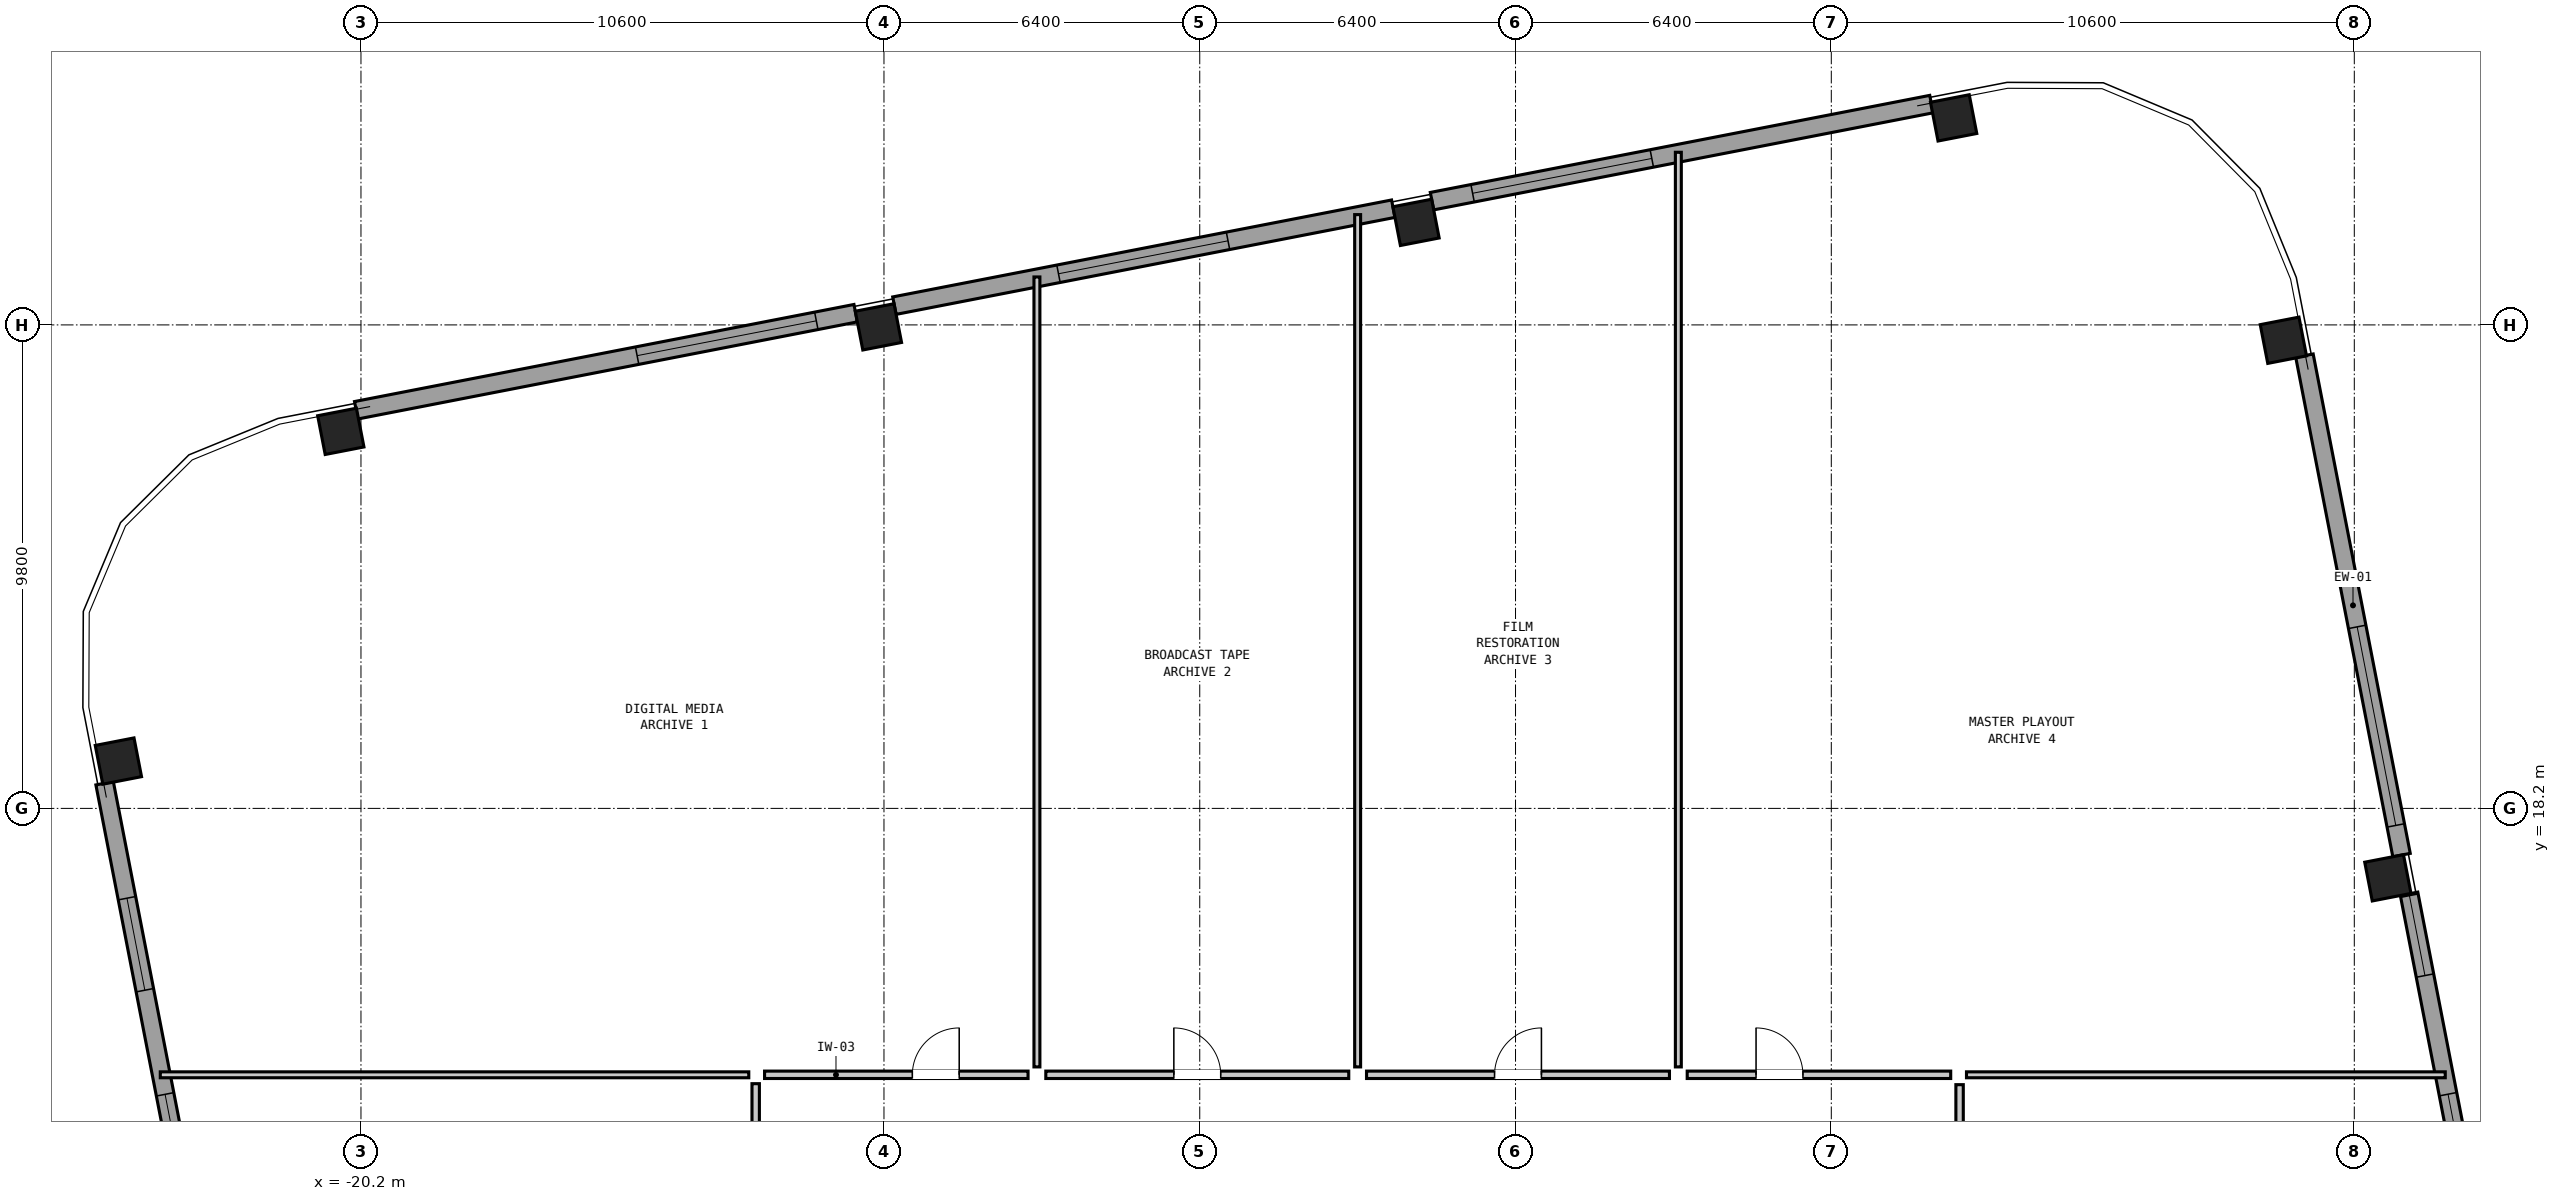
"""IFC4 building model, lengths in metres.
Left out: names, types, materials, properties, quantities, classifications, styles, units other than length and angle.
Written with IfcOpenShell. Run it as: python <this file> out.ifc"""

import sys

from ifc_helpers import new_model, si_unit, direction, frame, frame_2d, origin, origin_2d, place, context, subcontext, project, spatial, rectangle, hollow_rectangle, extrude, element, fill, save


model = new_model("IFC4")
c1 = context("Model", 3, precision=1e-05, world=origin(), true_north=direction((0.0, 1.0)))
c2 = subcontext(c1, "Body", "Model", "MODEL_VIEW")
j1 = project(units=[si_unit("LENGTHUNIT", "METRE"), si_unit("PLANEANGLEUNIT", "RADIAN")], contexts=[c1])
p1 = place(None, origin())
s1 = spatial("IfcSite", under=j1, at=p1, CompositionType="ELEMENT")
p2 = place(p1, origin())
s2 = spatial("IfcBuilding", under=s1, at=p2, CompositionType="ELEMENT")
p3 = place(p2, frame((0.0, 0.0, 131.1)))
s3 = spatial("IfcBuildingStorey", under=s2, at=p3, CompositionType="ELEMENT", Elevation=131.1)
for number, where, z_axis, x_axis in (
    (1, (20.88, 16.792, 0.0), (0.0, 0.0, 1.0), (-0.191, 0.982, 0.0)),
    (2, (18.762, 27.689, 0.0), (0.0, 0.0, 1.0), (-0.191, 0.982, 0.0)),
    (3, (12.08, 32.196, 0.0), (0.0, 0.0, 1.0), (0.982, 0.191, 0.0)),
    (4, (1.183, 30.078, 0.0), (0.0, 0.0, 1.0), (0.982, 0.191, 0.0)),
    (5, (-9.713, 27.96, 0.0), (0.0, 0.0, 1.0), (0.982, 0.191, 0.0)),
    (6, (-20.609, 25.842, 0.0), (0.0, 0.0, 1.0), (0.982, 0.191, 0.0)),
    (7, (-25.116, 19.159, 0.0), (0.0, 0.0, 1.0), (-0.191, 0.982, 0.0)),
):
    element("IfcColumn", number, at=place(p3, frame(where, z_axis=z_axis, x_axis=x_axis)), inside=s3, PredefinedType="COLUMN", context=c2, shape_type="SweptSolid", body=[
        extrude(hollow_rectangle(XDim=0.8, YDim=0.8, WallThickness=0.05, at=origin_2d()), origin(), (0.0, 0.0, 1.0), 3.05),
    ])
p4 = place(p3, frame((19.19, 27.376, 0.0), z_axis=(0.0, 0.0, 1.0), x_axis=(0.190822765986, -0.981624506612, 0.0)))
e8 = element("IfcWall", 8, at=p4, inside=s3, PredefinedType="SOLIDWALL", context=c2, shape_type="SweptSolid", body=[
    extrude(rectangle(XDim=10.312, YDim=0.36, at=frame_2d((5.156, 0.0))), origin(), (0.0, 0.0, 1.0), 2.067),
])
p5 = place(p4, frame((5.6, 0.0, 0.2)))
e9 = element("IfcOpeningElement", 9, at=p5, cuts=e8, PredefinedType="OPENING", context=c2, shape_type="SweptSolid", body=[
    extrude(rectangle(XDim=4.1, YDim=1.05, at=frame_2d((2.05, 0.525))), frame((0.0, 0.192, 0.0), z_axis=(0.0, -1.0, 0.0), x_axis=(1.0, 0.0, 0.0)), (0.0, 0.0, 1.0), 0.384),
])
p6 = place(p3, frame((21.31, 16.469, 0.0), z_axis=(0.0, 0.0, 1.0), x_axis=(0.190811924826, -0.981626614016, 0.0)))
e10 = element("IfcWall", 10, at=p6, inside=s3, PredefinedType="SOLIDWALL", context=c2, shape_type="SweptSolid", body=[
    extrude(rectangle(XDim=10.3, YDim=0.36, at=frame_2d((5.15, 0.0))), origin(), (0.0, 0.0, 1.0), 2.067),
])
p7 = place(p6, frame((0.038, 0.0, 1.15)))
e11 = element("IfcOpeningElement", 11, at=p7, cuts=e10, PredefinedType="OPENING", context=c2, shape_type="SweptSolid", body=[
    extrude(rectangle(XDim=1.65, YDim=0.75, at=frame_2d((0.825, 0.375))), frame((0.0, 0.192, 0.0), z_axis=(0.0, -1.0, 0.0), x_axis=(1.0, 0.0, 0.0)), (0.0, 0.0, 1.0), 0.384),
])
p8 = place(p6, frame((4.138, 0.0, 0.2)))
e12 = element("IfcOpeningElement", 12, at=p8, cuts=e10, PredefinedType="OPENING", context=c2, shape_type="SweptSolid", body=[
    extrude(rectangle(XDim=2.6, YDim=1.3, at=frame_2d((1.3, 0.65))), frame((0.0, 0.192, 0.0), z_axis=(0.0, -1.0, 0.0), x_axis=(1.0, 0.0, 0.0)), (0.0, 0.0, 1.0), 0.384),
])
p9 = place(p6, frame((8.638, 0.0, 1.15)))
e13 = element("IfcOpeningElement", 13, at=p9, cuts=e10, PredefinedType="OPENING", context=c2, shape_type="SweptSolid", body=[
    extrude(rectangle(XDim=1.6, YDim=0.75, at=frame_2d((0.8, 0.375))), frame((0.0, 0.192, 0.0), z_axis=(0.0, -1.0, 0.0), x_axis=(1.0, 0.0, 0.0)), (0.0, 0.0, 1.0), 0.384),
])
p10 = place(p3, frame((-20.296, 26.27, 0.0), z_axis=(0.0, 0.0, 1.0), x_axis=(0.981628941133, 0.190799952646, 0.0)))
e14 = element("IfcWall", 14, at=p10, inside=s3, PredefinedType="SOLIDWALL", context=c2, shape_type="SweptSolid", body=[
    extrude(rectangle(XDim=10.312, YDim=0.36, at=frame_2d((5.156, 0.0))), origin(), (0.0, 0.0, 1.0), 2.067),
])
p11 = place(p10, frame((5.8, 0.0, 0.2)))
e15 = element("IfcOpeningElement", 15, at=p11, cuts=e14, PredefinedType="OPENING", context=c2, shape_type="SweptSolid", body=[
    extrude(rectangle(XDim=3.7, YDim=1.1, at=frame_2d((1.85, 0.55))), frame((0.0, 0.192, 0.0), z_axis=(0.0, -1.0, 0.0), x_axis=(1.0, 0.0, 0.0)), (0.0, 0.0, 1.0), 0.384),
])
p12 = place(p3, frame((-9.389, 28.39, 0.0), z_axis=(0.0, 0.0, 1.0), x_axis=(0.981627477005, 0.190807485147, 0.0)))
e16 = element("IfcWall", 16, at=p12, inside=s3, PredefinedType="SOLIDWALL", context=c2, shape_type="SweptSolid", body=[
    extrude(rectangle(XDim=10.3, YDim=0.36, at=frame_2d((5.15, 0.0))), origin(), (0.0, 0.0, 1.0), 2.067),
])
p13 = place(p12, frame((3.388, 0.0, 0.2)))
e17 = element("IfcOpeningElement", 17, at=p13, cuts=e16, PredefinedType="OPENING", context=c2, shape_type="SweptSolid", body=[
    extrude(rectangle(XDim=3.5, YDim=1.15, at=frame_2d((1.75, 0.575))), frame((0.0, 0.192, 0.0), z_axis=(0.0, -1.0, 0.0), x_axis=(1.0, 0.0, 0.0)), (0.0, 0.0, 1.0), 0.384),
])
p14 = place(p3, frame((1.507, 30.508, 0.0), z_axis=(0.0, 0.0, 1.0), x_axis=(0.981628941133, 0.190799952646, 0.0)))
e18 = element("IfcWall", 18, at=p14, inside=s3, PredefinedType="SOLIDWALL", context=c2, shape_type="SweptSolid", body=[
    extrude(rectangle(XDim=10.312, YDim=0.36, at=frame_2d((5.156, 0.0))), origin(), (0.0, 0.0, 1.0), 2.067),
])
p15 = place(p14, frame((0.838, 0.0, 0.2)))
e19 = element("IfcOpeningElement", 19, at=p15, cuts=e18, PredefinedType="OPENING", context=c2, shape_type="SweptSolid", body=[
    extrude(rectangle(XDim=3.7, YDim=1.1, at=frame_2d((1.85, 0.55))), frame((0.0, 0.192, 0.0), z_axis=(0.0, -1.0, 0.0), x_axis=(1.0, 0.0, 0.0)), (0.0, 0.0, 1.0), 0.384),
])
p16 = place(p3, frame((-23.428, 8.587, 0.0), z_axis=(0.0, 0.0, 1.0), x_axis=(-0.190822765986, 0.981624506612, 0.0)))
e20 = element("IfcWall", 20, at=p16, inside=s3, PredefinedType="SOLIDWALL", context=c2, shape_type="SweptSolid", body=[
    extrude(rectangle(XDim=10.312, YDim=0.36, at=frame_2d((5.156, 0.0))), origin(), (0.0, 0.0, 1.0), 2.067),
])
p17 = place(p16, frame((1.188, 0.0, 0.2)))
e21 = element("IfcOpeningElement", 21, at=p17, cuts=e20, PredefinedType="OPENING", context=c2, shape_type="SweptSolid", body=[
    extrude(rectangle(XDim=2.7, YDim=1.35, at=frame_2d((1.35, 0.675))), frame((0.0, 0.192, 0.0), z_axis=(0.0, -1.0, 0.0), x_axis=(1.0, 0.0, 0.0)), (0.0, 0.0, 1.0), 0.384),
])
p18 = place(p16, frame((6.038, 0.0, 1.2)))
e22 = element("IfcOpeningElement", 22, at=p18, cuts=e20, PredefinedType="OPENING", context=c2, shape_type="SweptSolid", body=[
    extrude(rectangle(XDim=1.9, YDim=0.7, at=frame_2d((0.95, 0.35))), frame((0.0, 0.192, 0.0), z_axis=(0.0, -1.0, 0.0), x_axis=(1.0, 0.0, 0.0)), (0.0, 0.0, 1.0), 0.384),
])
p19 = place(p3, frame((-24.267, 12.8, 0.0), z_axis=(0.0, 0.0, 1.0), x_axis=(1.0, 0.0, 0.0)))
e23 = element("IfcWall", 23, at=p19, inside=s3, PredefinedType="PARTITIONING", context=c2, shape_type="SweptSolid", body=[
    extrude(rectangle(XDim=11.927, YDim=0.12, at=frame_2d((5.964, 0.0))), origin(), (0.0, 0.0, 1.0), 2.83),
])
p20 = place(p3, frame((12.34, 12.8, 0.0), z_axis=(0.0, 0.0, 1.0), x_axis=(1.0, 0.0, 0.0)))
e24 = element("IfcWall", 24, at=p20, inside=s3, PredefinedType="PARTITIONING", context=c2, shape_type="SweptSolid", body=[
    extrude(rectangle(XDim=9.703, YDim=0.12, at=frame_2d((4.852, 0.0))), origin(), (0.0, 0.0, 1.0), 2.83),
])
p21 = place(p3, frame((-6.5, 12.96, 0.0), z_axis=(0.0, 0.0, 1.0), x_axis=(0.0, 1.0, 0.0)))
e25 = element("IfcWall", 25, at=p21, inside=s3, PredefinedType="PARTITIONING", context=c2, shape_type="SweptSolid", body=[
    extrude(rectangle(XDim=16.012, YDim=0.12, at=frame_2d((8.006, 0.0))), origin(), (0.0, 0.0, 1.0), 2.347),
])
p22 = place(p3, frame((0.0, 12.96, 0.0), z_axis=(0.0, 0.0, 1.0), x_axis=(0.0, 1.0, 0.0)))
e26 = element("IfcWall", 26, at=p22, inside=s3, PredefinedType="PARTITIONING", context=c2, shape_type="SweptSolid", body=[
    extrude(rectangle(XDim=17.275, YDim=0.12, at=frame_2d((8.638, 0.0))), origin(), (0.0, 0.0, 1.0), 2.347),
])
p23 = place(p3, frame((6.5, 12.96, 0.0), z_axis=(0.0, 0.0, 1.0), x_axis=(0.0, 1.0, 0.0)))
e27 = element("IfcWall", 27, at=p23, inside=s3, PredefinedType="PARTITIONING", context=c2, shape_type="SweptSolid", body=[
    extrude(rectangle(XDim=18.539, YDim=0.12, at=frame_2d((9.27, 0.0))), origin(), (0.0, 0.0, 1.0), 2.347),
])
p24 = place(p3, frame((-12.02, 12.8, 0.0), z_axis=(0.0, 0.0, 1.0), x_axis=(1.0, 0.0, 0.0)))
e28 = element("IfcWall", 28, at=p24, inside=s3, PredefinedType="PARTITIONING", context=c2, shape_type="SweptSolid", body=[
    extrude(rectangle(XDim=5.34, YDim=0.15, at=frame_2d((2.67, 0.0))), origin(), (0.0, 0.0, 1.0), 2.83),
])
p25 = place(p24, frame((2.995, 0.0, 0.0)))
e29 = element("IfcOpeningElement", 29, at=p25, cuts=e28, PredefinedType="OPENING", context=c2, shape_type="SweptSolid", body=[
    extrude(rectangle(XDim=0.95, YDim=2.1, at=frame_2d((0.475, 1.05))), frame((0.0, 0.087, 0.0), z_axis=(0.0, -1.0, 0.0), x_axis=(1.0, 0.0, 0.0)), (0.0, 0.0, 1.0), 0.174),
])
p26 = place(p3, frame((-6.32, 12.8, 0.0), z_axis=(0.0, 0.0, 1.0), x_axis=(1.0, 0.0, 0.0)))
e30 = element("IfcWall", 30, at=p26, inside=s3, PredefinedType="PARTITIONING", context=c2, shape_type="SweptSolid", body=[
    extrude(rectangle(XDim=6.14, YDim=0.15, at=frame_2d((3.07, 0.0))), origin(), (0.0, 0.0, 1.0), 2.83),
])
p27 = place(p26, frame((2.595, 0.0, 0.0)))
e31 = element("IfcOpeningElement", 31, at=p27, cuts=e30, PredefinedType="OPENING", context=c2, shape_type="SweptSolid", body=[
    extrude(rectangle(XDim=0.95, YDim=2.1, at=frame_2d((0.475, 1.05))), frame((0.0, 0.087, 0.0), z_axis=(0.0, -1.0, 0.0), x_axis=(1.0, 0.0, 0.0)), (0.0, 0.0, 1.0), 0.174),
])
p28 = place(p3, frame((0.18, 12.8, 0.0), z_axis=(0.0, 0.0, 1.0), x_axis=(1.0, 0.0, 0.0)))
e32 = element("IfcWall", 32, at=p28, inside=s3, PredefinedType="PARTITIONING", context=c2, shape_type="SweptSolid", body=[
    extrude(rectangle(XDim=6.14, YDim=0.15, at=frame_2d((3.07, 0.0))), origin(), (0.0, 0.0, 1.0), 2.83),
])
p29 = place(p28, frame((2.595, 0.0, 0.0)))
e33 = element("IfcOpeningElement", 33, at=p29, cuts=e32, PredefinedType="OPENING", context=c2, shape_type="SweptSolid", body=[
    extrude(rectangle(XDim=0.95, YDim=2.1, at=frame_2d((0.475, 1.05))), frame((0.0, 0.087, 0.0), z_axis=(0.0, -1.0, 0.0), x_axis=(1.0, 0.0, 0.0)), (0.0, 0.0, 1.0), 0.174),
])
p30 = place(p3, frame((6.68, 12.8, 0.0), z_axis=(0.0, 0.0, 1.0), x_axis=(1.0, 0.0, 0.0)))
e34 = element("IfcWall", 34, at=p30, inside=s3, PredefinedType="PARTITIONING", context=c2, shape_type="SweptSolid", body=[
    extrude(rectangle(XDim=5.34, YDim=0.15, at=frame_2d((2.67, 0.0))), origin(), (0.0, 0.0, 1.0), 2.83),
])
p31 = place(p30, frame((1.395, 0.0, 0.0)))
e35 = element("IfcOpeningElement", 35, at=p31, cuts=e34, PredefinedType="OPENING", context=c2, shape_type="SweptSolid", body=[
    extrude(rectangle(XDim=0.95, YDim=2.1, at=frame_2d((0.475, 1.05))), frame((0.0, 0.087, 0.0), z_axis=(0.0, -1.0, 0.0), x_axis=(1.0, 0.0, 0.0)), (0.0, 0.0, 1.0), 0.174),
])
p32 = place(p3, frame((-12.2, 3.68, 0.0), z_axis=(0.0, 0.0, 1.0), x_axis=(0.0, 1.0, 0.0)))
e36 = element("IfcWall", 36, at=p32, inside=s3, PredefinedType="PARTITIONING", context=c2, shape_type="SweptSolid", body=[
    extrude(rectangle(XDim=8.94, YDim=0.15, at=frame_2d((4.47, 0.0))), origin(), (0.0, 0.0, 1.0), 2.83),
])
p33 = place(p32, frame((3.995, 0.0, 0.0)))
e37 = element("IfcOpeningElement", 37, at=p33, cuts=e36, PredefinedType="OPENING", context=c2, shape_type="SweptSolid", body=[
    extrude(rectangle(XDim=0.95, YDim=2.1, at=frame_2d((0.475, 1.05))), frame((0.0, 0.087, 0.0), z_axis=(0.0, -1.0, 0.0), x_axis=(1.0, 0.0, 0.0)), (0.0, 0.0, 1.0), 0.174),
])
p34 = place(p3, frame((12.2, 3.8, 0.0), z_axis=(0.0, 0.0, 1.0), x_axis=(0.0, 1.0, 0.0)))
e38 = element("IfcWall", 38, at=p34, inside=s3, PredefinedType="PARTITIONING", context=c2, shape_type="SweptSolid", body=[
    extrude(rectangle(XDim=8.8, YDim=0.15, at=frame_2d((4.4, 0.0))), origin(), (0.0, 0.0, 1.0), 2.83),
])
p35 = place(p34, frame((3.925, 0.0, 0.0)))
e39 = element("IfcOpeningElement", 39, at=p35, cuts=e38, PredefinedType="OPENING", context=c2, shape_type="SweptSolid", body=[
    extrude(rectangle(XDim=0.95, YDim=2.1, at=frame_2d((0.475, 1.05))), frame((0.0, 0.087, 0.0), z_axis=(0.0, -1.0, 0.0), x_axis=(1.0, 0.0, 0.0)), (0.0, 0.0, 1.0), 0.174),
])
p36 = place(p5, origin())
e40 = element("IfcWindow", 40, at=p36, inside=s3, PartitioningType="SINGLE_PANEL", PredefinedType="WINDOW", context=c2, shape_type="SweptSolid", body=[
    extrude(rectangle(XDim=4.1, YDim=1.05, at=frame_2d((2.05, 0.525))), frame((0.0, 0.03, 0.0), z_axis=(0.0, -1.0, 0.0), x_axis=(1.0, 0.0, 0.0)), (0.0, 0.0, 1.0), 0.06),
])
fill(e9, e40)
p37 = place(p7, origin())
e41 = element("IfcWindow", 41, at=p37, inside=s3, PartitioningType="SINGLE_PANEL", PredefinedType="WINDOW", context=c2, shape_type="SweptSolid", body=[
    extrude(rectangle(XDim=1.65, YDim=0.75, at=frame_2d((0.825, 0.375))), frame((0.0, 0.03, 0.0), z_axis=(0.0, -1.0, 0.0), x_axis=(1.0, 0.0, 0.0)), (0.0, 0.0, 1.0), 0.06),
])
fill(e11, e41)
p38 = place(p8, origin())
e42 = element("IfcWindow", 42, at=p38, inside=s3, PartitioningType="SINGLE_PANEL", PredefinedType="WINDOW", context=c2, shape_type="SweptSolid", body=[
    extrude(rectangle(XDim=2.6, YDim=1.3, at=frame_2d((1.3, 0.65))), frame((0.0, 0.03, 0.0), z_axis=(0.0, -1.0, 0.0), x_axis=(1.0, 0.0, 0.0)), (0.0, 0.0, 1.0), 0.06),
])
fill(e12, e42)
p39 = place(p11, origin())
e43 = element("IfcWindow", 43, at=p39, inside=s3, PartitioningType="SINGLE_PANEL", PredefinedType="WINDOW", context=c2, shape_type="SweptSolid", body=[
    extrude(rectangle(XDim=3.7, YDim=1.1, at=frame_2d((1.85, 0.55))), frame((0.0, 0.03, 0.0), z_axis=(0.0, -1.0, 0.0), x_axis=(1.0, 0.0, 0.0)), (0.0, 0.0, 1.0), 0.06),
])
fill(e15, e43)
p40 = place(p13, origin())
e44 = element("IfcWindow", 44, at=p40, inside=s3, PartitioningType="SINGLE_PANEL", PredefinedType="WINDOW", context=c2, shape_type="SweptSolid", body=[
    extrude(rectangle(XDim=3.5, YDim=1.15, at=frame_2d((1.75, 0.575))), frame((0.0, 0.03, 0.0), z_axis=(0.0, -1.0, 0.0), x_axis=(1.0, 0.0, 0.0)), (0.0, 0.0, 1.0), 0.06),
])
fill(e17, e44)
p41 = place(p15, origin())
e45 = element("IfcWindow", 45, at=p41, inside=s3, PartitioningType="SINGLE_PANEL", PredefinedType="WINDOW", context=c2, shape_type="SweptSolid", body=[
    extrude(rectangle(XDim=3.7, YDim=1.1, at=frame_2d((1.85, 0.55))), frame((0.0, 0.03, 0.0), z_axis=(0.0, -1.0, 0.0), x_axis=(1.0, 0.0, 0.0)), (0.0, 0.0, 1.0), 0.06),
])
fill(e19, e45)
p42 = place(p17, origin())
e46 = element("IfcWindow", 46, at=p42, inside=s3, PartitioningType="SINGLE_PANEL", PredefinedType="WINDOW", context=c2, shape_type="SweptSolid", body=[
    extrude(rectangle(XDim=2.7, YDim=1.35, at=frame_2d((1.35, 0.675))), frame((0.0, 0.03, 0.0), z_axis=(0.0, -1.0, 0.0), x_axis=(1.0, 0.0, 0.0)), (0.0, 0.0, 1.0), 0.06),
])
fill(e21, e46)
p43 = place(p18, origin())
e47 = element("IfcWindow", 47, at=p43, inside=s3, PartitioningType="SINGLE_PANEL", PredefinedType="WINDOW", context=c2, shape_type="SweptSolid", body=[
    extrude(rectangle(XDim=1.9, YDim=0.7, at=frame_2d((0.95, 0.35))), frame((0.0, 0.03, 0.0), z_axis=(0.0, -1.0, 0.0), x_axis=(1.0, 0.0, 0.0)), (0.0, 0.0, 1.0), 0.06),
])
fill(e22, e47)
p44 = place(p25, origin())
e48 = element("IfcDoor", 48, at=p44, inside=s3, OperationType="SINGLE_SWING_RIGHT", PredefinedType="DOOR", context=c2, shape_type="SweptSolid", body=[
    extrude(rectangle(XDim=0.95, YDim=2.1, at=frame_2d((0.475, 1.05))), frame((0.0, 0.025, 0.0), z_axis=(0.0, -1.0, 0.0), x_axis=(1.0, 0.0, 0.0)), (0.0, 0.0, 1.0), 0.05),
])
fill(e29, e48)
p45 = place(p27, origin())
e49 = element("IfcDoor", 49, at=p45, inside=s3, OperationType="SINGLE_SWING_LEFT", PredefinedType="DOOR", context=c2, shape_type="SweptSolid", body=[
    extrude(rectangle(XDim=0.95, YDim=2.1, at=frame_2d((0.475, 1.05))), frame((0.0, 0.025, 0.0), z_axis=(0.0, -1.0, 0.0), x_axis=(1.0, 0.0, 0.0)), (0.0, 0.0, 1.0), 0.05),
])
fill(e31, e49)
p46 = place(p29, origin())
e50 = element("IfcDoor", 50, at=p46, inside=s3, OperationType="SINGLE_SWING_RIGHT", PredefinedType="DOOR", context=c2, shape_type="SweptSolid", body=[
    extrude(rectangle(XDim=0.95, YDim=2.1, at=frame_2d((0.475, 1.05))), frame((0.0, 0.025, 0.0), z_axis=(0.0, -1.0, 0.0), x_axis=(1.0, 0.0, 0.0)), (0.0, 0.0, 1.0), 0.05),
])
fill(e33, e50)
p47 = place(p31, origin())
e51 = element("IfcDoor", 51, at=p47, inside=s3, OperationType="SINGLE_SWING_LEFT", PredefinedType="DOOR", context=c2, shape_type="SweptSolid", body=[
    extrude(rectangle(XDim=0.95, YDim=2.1, at=frame_2d((0.475, 1.05))), frame((0.0, 0.025, 0.0), z_axis=(0.0, -1.0, 0.0), x_axis=(1.0, 0.0, 0.0)), (0.0, 0.0, 1.0), 0.05),
])
fill(e35, e51)
save(model, sys.argv[1])
